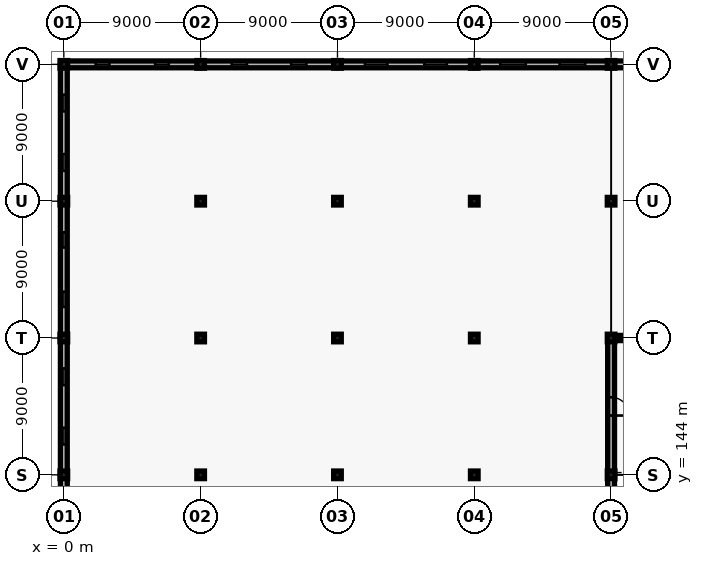
"""IFC4 building model, lengths in metres.
Left out: names, types, materials, properties, quantities, classifications, styles, units other than length and angle.
Written with IfcOpenShell. Run it as: python <this file> out.ifc"""

import sys

from ifc_helpers import new_model, si_unit, direction, frame, frame_2d, origin, origin_2d, place, context, subcontext, project, spatial, rectangle, extrude, element, fill, save


model = new_model("IFC4")
c1 = context("Model", 3, precision=1e-05, world=origin(), true_north=direction((0.0, 1.0)))
c2 = subcontext(c1, "Body", "Model", "MODEL_VIEW")
j1 = project(units=[si_unit("LENGTHUNIT", "METRE"), si_unit("PLANEANGLEUNIT", "RADIAN")], contexts=[c1])
p1 = place(None, origin())
s1 = spatial("IfcSite", under=j1, at=p1, CompositionType="ELEMENT")
p2 = place(p1, origin())
s2 = spatial("IfcBuilding", under=s1, at=p2, CompositionType="ELEMENT")
p3 = place(p2, frame((0.0, 0.0, 9.6)))
s3 = spatial("IfcBuildingStorey", under=s2, at=p3, CompositionType="ELEMENT", Elevation=9.6)
for number, where, z_axis, x_axis in (
    (1, (0.0, 144.0, 0.0), (0.0, 0.0, 1.0), (1.0, 0.0, 0.0)),
    (2, (0.0, 153.0, 0.0), (0.0, 0.0, 1.0), (1.0, 0.0, 0.0)),
    (3, (0.0, 162.0, 0.0), (0.0, 0.0, 1.0), (1.0, 0.0, 0.0)),
    (4, (0.0, 171.0, 0.0), (0.0, 0.0, 1.0), (1.0, 0.0, 0.0)),
    (5, (9.0, 144.0, 0.0), (0.0, 0.0, 1.0), (1.0, 0.0, 0.0)),
    (6, (9.0, 153.0, 0.0), (0.0, 0.0, 1.0), (1.0, 0.0, 0.0)),
    (7, (9.0, 162.0, 0.0), (0.0, 0.0, 1.0), (1.0, 0.0, 0.0)),
    (8, (9.0, 171.0, 0.0), (0.0, 0.0, 1.0), (1.0, 0.0, 0.0)),
    (9, (18.0, 144.0, 0.0), (0.0, 0.0, 1.0), (1.0, 0.0, 0.0)),
    (10, (18.0, 153.0, 0.0), (0.0, 0.0, 1.0), (1.0, 0.0, 0.0)),
    (11, (18.0, 162.0, 0.0), (0.0, 0.0, 1.0), (1.0, 0.0, 0.0)),
    (12, (18.0, 171.0, 0.0), (0.0, 0.0, 1.0), (1.0, 0.0, 0.0)),
    (13, (27.0, 144.0, 0.0), (0.0, 0.0, 1.0), (1.0, 0.0, 0.0)),
    (14, (27.0, 153.0, 0.0), (0.0, 0.0, 1.0), (1.0, 0.0, 0.0)),
    (15, (27.0, 162.0, 0.0), (0.0, 0.0, 1.0), (1.0, 0.0, 0.0)),
    (16, (27.0, 171.0, 0.0), (0.0, 0.0, 1.0), (1.0, 0.0, 0.0)),
    (17, (36.0, 144.0, 0.0), (0.0, 0.0, 1.0), (1.0, 0.0, 0.0)),
    (18, (36.0, 153.0, 0.0), (0.0, 0.0, 1.0), (1.0, 0.0, 0.0)),
    (19, (36.0, 162.0, 0.0), (0.0, 0.0, 1.0), (1.0, 0.0, 0.0)),
    (20, (36.0, 171.0, 0.0), (0.0, 0.0, 1.0), (1.0, 0.0, 0.0)),
):
    element("IfcColumn", number, at=place(p3, frame(where, z_axis=z_axis, x_axis=x_axis)), inside=s3, PredefinedType="COLUMN", context=c2, shape_type="SweptSolid", body=[
        extrude(rectangle(XDim=0.5, YDim=0.5, at=origin_2d()), origin(), (0.0, 0.0, 1.0), 3.9),
    ])
p4 = place(p3, frame((0.06, 171.0, 0.0), z_axis=(0.0, 0.0, 1.0), x_axis=(1.0, 0.0, 0.0)))
e21 = element("IfcWall", 21, at=p4, inside=s3, PredefinedType="SOLIDWALL", context=c2, shape_type="SweptSolid", body=[
    extrude(rectangle(XDim=8.88, YDim=0.45, at=frame_2d((4.44, 0.0))), origin(), (0.0, 0.0, 1.0), 3.15),
])
p5 = place(p4, frame((2.036, 0.0, 0.9)))
e22 = element("IfcOpeningElement", 22, at=p5, cuts=e21, PredefinedType="OPENING", context=c2, shape_type="SweptSolid", body=[
    extrude(rectangle(XDim=0.9, YDim=1.2, at=frame_2d((0.45, 0.6))), frame((0.0, 0.235, 0.0), z_axis=(0.0, -1.0, 0.0), x_axis=(1.0, 0.0, 0.0)), (0.0, 0.0, 1.0), 0.47),
])
p6 = place(p4, frame((5.944, 0.0, 0.9)))
e23 = element("IfcOpeningElement", 23, at=p6, cuts=e21, PredefinedType="OPENING", context=c2, shape_type="SweptSolid", body=[
    extrude(rectangle(XDim=0.9, YDim=1.2, at=frame_2d((0.45, 0.6))), frame((0.0, 0.235, 0.0), z_axis=(0.0, -1.0, 0.0), x_axis=(1.0, 0.0, 0.0)), (0.0, 0.0, 1.0), 0.47),
])
p7 = place(p3, frame((9.06, 171.0, 0.0), z_axis=(0.0, 0.0, 1.0), x_axis=(1.0, 0.0, 0.0)))
e24 = element("IfcWall", 24, at=p7, inside=s3, PredefinedType="SOLIDWALL", context=c2, shape_type="SweptSolid", body=[
    extrude(rectangle(XDim=8.88, YDim=0.45, at=frame_2d((4.44, 0.0))), origin(), (0.0, 0.0, 1.0), 3.15),
])
p8 = place(p7, frame((1.986, 0.0, 0.9)))
e25 = element("IfcOpeningElement", 25, at=p8, cuts=e24, PredefinedType="OPENING", context=c2, shape_type="SweptSolid", body=[
    extrude(rectangle(XDim=1.0, YDim=1.5, at=frame_2d((0.5, 0.75))), frame((0.0, 0.235, 0.0), z_axis=(0.0, -1.0, 0.0), x_axis=(1.0, 0.0, 0.0)), (0.0, 0.0, 1.0), 0.47),
])
p9 = place(p7, frame((5.894, 0.0, 0.9)))
e26 = element("IfcOpeningElement", 26, at=p9, cuts=e24, PredefinedType="OPENING", context=c2, shape_type="SweptSolid", body=[
    extrude(rectangle(XDim=1.0, YDim=1.5, at=frame_2d((0.5, 0.75))), frame((0.0, 0.235, 0.0), z_axis=(0.0, -1.0, 0.0), x_axis=(1.0, 0.0, 0.0)), (0.0, 0.0, 1.0), 0.47),
])
p10 = place(p3, frame((18.06, 171.0, 0.0), z_axis=(0.0, 0.0, 1.0), x_axis=(1.0, 0.0, 0.0)))
e27 = element("IfcWall", 27, at=p10, inside=s3, PredefinedType="SOLIDWALL", context=c2, shape_type="SweptSolid", body=[
    extrude(rectangle(XDim=8.88, YDim=0.45, at=frame_2d((4.44, 0.0))), origin(), (0.0, 0.0, 1.0), 3.15),
])
p11 = place(p10, frame((1.746, 0.0, 0.9)))
e28 = element("IfcOpeningElement", 28, at=p11, cuts=e27, PredefinedType="OPENING", context=c2, shape_type="SweptSolid", body=[
    extrude(rectangle(XDim=1.48, YDim=1.75, at=frame_2d((0.74, 0.875))), frame((0.0, 0.235, 0.0), z_axis=(0.0, -1.0, 0.0), x_axis=(1.0, 0.0, 0.0)), (0.0, 0.0, 1.0), 0.47),
])
p12 = place(p10, frame((5.654, 0.0, 0.9)))
e29 = element("IfcOpeningElement", 29, at=p12, cuts=e27, PredefinedType="OPENING", context=c2, shape_type="SweptSolid", body=[
    extrude(rectangle(XDim=1.48, YDim=1.75, at=frame_2d((0.74, 0.875))), frame((0.0, 0.235, 0.0), z_axis=(0.0, -1.0, 0.0), x_axis=(1.0, 0.0, 0.0)), (0.0, 0.0, 1.0), 0.47),
])
p13 = place(p3, frame((27.06, 171.0, 0.0), z_axis=(0.0, 0.0, 1.0), x_axis=(1.0, 0.0, 0.0)))
e30 = element("IfcWall", 30, at=p13, inside=s3, PredefinedType="SOLIDWALL", context=c2, shape_type="SweptSolid", body=[
    extrude(rectangle(XDim=8.88, YDim=0.45, at=frame_2d((4.44, 0.0))), origin(), (0.0, 0.0, 1.0), 3.15),
])
p14 = place(p13, frame((1.646, 0.0, 0.9)))
e31 = element("IfcOpeningElement", 31, at=p14, cuts=e30, PredefinedType="OPENING", context=c2, shape_type="SweptSolid", body=[
    extrude(rectangle(XDim=1.68, YDim=1.85, at=frame_2d((0.84, 0.925))), frame((0.0, 0.235, 0.0), z_axis=(0.0, -1.0, 0.0), x_axis=(1.0, 0.0, 0.0)), (0.0, 0.0, 1.0), 0.47),
])
p15 = place(p13, frame((5.554, 0.0, 0.9)))
e32 = element("IfcOpeningElement", 32, at=p15, cuts=e30, PredefinedType="OPENING", context=c2, shape_type="SweptSolid", body=[
    extrude(rectangle(XDim=1.68, YDim=1.85, at=frame_2d((0.84, 0.925))), frame((0.0, 0.235, 0.0), z_axis=(0.0, -1.0, 0.0), x_axis=(1.0, 0.0, 0.0)), (0.0, 0.0, 1.0), 0.47),
])
p16 = place(p3, frame((36.06, 171.0, 0.0), z_axis=(0.0, 0.0, 1.0), x_axis=(1.0, 0.0, 0.0)))
e33 = element("IfcWall", 33, at=p16, inside=s3, PredefinedType="SOLIDWALL", context=c2, shape_type="SweptSolid", body=[
    extrude(rectangle(XDim=8.88, YDim=0.45, at=frame_2d((4.44, 0.0))), origin(), (0.0, 0.0, 1.0), 3.15),
])
p17 = place(p16, frame((2.036, 0.0, 0.9)))
e34 = element("IfcOpeningElement", 34, at=p17, cuts=e33, PredefinedType="OPENING", context=c2, shape_type="SweptSolid", body=[
    extrude(rectangle(XDim=0.9, YDim=1.2, at=frame_2d((0.45, 0.6))), frame((0.0, 0.235, 0.0), z_axis=(0.0, -1.0, 0.0), x_axis=(1.0, 0.0, 0.0)), (0.0, 0.0, 1.0), 0.47),
])
p18 = place(p16, frame((5.944, 0.0, 0.9)))
e35 = element("IfcOpeningElement", 35, at=p18, cuts=e33, PredefinedType="OPENING", context=c2, shape_type="SweptSolid", body=[
    extrude(rectangle(XDim=0.9, YDim=1.2, at=frame_2d((0.45, 0.6))), frame((0.0, 0.235, 0.0), z_axis=(0.0, -1.0, 0.0), x_axis=(1.0, 0.0, 0.0)), (0.0, 0.0, 1.0), 0.47),
])
p19 = place(p3, frame((0.0, 135.06, 0.0), z_axis=(0.0, 0.0, 1.0), x_axis=(0.0, 1.0, 0.0)))
e36 = element("IfcWall", 36, at=p19, inside=s3, PredefinedType="SOLIDWALL", context=c2, shape_type="SweptSolid", body=[
    extrude(rectangle(XDim=8.88, YDim=0.45, at=frame_2d((4.44, 0.0))), origin(), (0.0, 0.0, 1.0), 3.15),
])
p20 = place(p19, frame((1.986, 0.0, 0.9)))
e37 = element("IfcOpeningElement", 37, at=p20, cuts=e36, PredefinedType="OPENING", context=c2, shape_type="SweptSolid", body=[
    extrude(rectangle(XDim=1.0, YDim=1.5, at=frame_2d((0.5, 0.75))), frame((0.0, 0.235, 0.0), z_axis=(0.0, -1.0, 0.0), x_axis=(1.0, 0.0, 0.0)), (0.0, 0.0, 1.0), 0.47),
])
p21 = place(p19, frame((5.894, 0.0, 0.9)))
e38 = element("IfcOpeningElement", 38, at=p21, cuts=e36, PredefinedType="OPENING", context=c2, shape_type="SweptSolid", body=[
    extrude(rectangle(XDim=1.0, YDim=1.5, at=frame_2d((0.5, 0.75))), frame((0.0, 0.235, 0.0), z_axis=(0.0, -1.0, 0.0), x_axis=(1.0, 0.0, 0.0)), (0.0, 0.0, 1.0), 0.47),
])
p22 = place(p3, frame((0.0, 144.06, 0.0), z_axis=(0.0, 0.0, 1.0), x_axis=(0.0, 1.0, 0.0)))
e39 = element("IfcWall", 39, at=p22, inside=s3, PredefinedType="SOLIDWALL", context=c2, shape_type="SweptSolid", body=[
    extrude(rectangle(XDim=8.88, YDim=0.45, at=frame_2d((4.44, 0.0))), origin(), (0.0, 0.0, 1.0), 3.15),
])
p23 = place(p22, frame((1.936, 0.0, 0.9)))
e40 = element("IfcOpeningElement", 40, at=p23, cuts=e39, PredefinedType="OPENING", context=c2, shape_type="SweptSolid", body=[
    extrude(rectangle(XDim=1.1, YDim=1.65, at=frame_2d((0.55, 0.825))), frame((0.0, 0.235, 0.0), z_axis=(0.0, -1.0, 0.0), x_axis=(1.0, 0.0, 0.0)), (0.0, 0.0, 1.0), 0.47),
])
p24 = place(p22, frame((5.844, 0.0, 0.9)))
e41 = element("IfcOpeningElement", 41, at=p24, cuts=e39, PredefinedType="OPENING", context=c2, shape_type="SweptSolid", body=[
    extrude(rectangle(XDim=1.1, YDim=1.65, at=frame_2d((0.55, 0.825))), frame((0.0, 0.235, 0.0), z_axis=(0.0, -1.0, 0.0), x_axis=(1.0, 0.0, 0.0)), (0.0, 0.0, 1.0), 0.47),
])
p25 = place(p3, frame((0.0, 153.06, 0.0), z_axis=(0.0, 0.0, 1.0), x_axis=(0.0, 1.0, 0.0)))
e42 = element("IfcWall", 42, at=p25, inside=s3, PredefinedType="SOLIDWALL", context=c2, shape_type="SweptSolid", body=[
    extrude(rectangle(XDim=8.88, YDim=0.45, at=frame_2d((4.44, 0.0))), origin(), (0.0, 0.0, 1.0), 3.15),
])
p26 = place(p25, frame((1.986, 0.0, 0.9)))
e43 = element("IfcOpeningElement", 43, at=p26, cuts=e42, PredefinedType="OPENING", context=c2, shape_type="SweptSolid", body=[
    extrude(rectangle(XDim=1.0, YDim=1.5, at=frame_2d((0.5, 0.75))), frame((0.0, 0.235, 0.0), z_axis=(0.0, -1.0, 0.0), x_axis=(1.0, 0.0, 0.0)), (0.0, 0.0, 1.0), 0.47),
])
p27 = place(p25, frame((5.894, 0.0, 0.9)))
e44 = element("IfcOpeningElement", 44, at=p27, cuts=e42, PredefinedType="OPENING", context=c2, shape_type="SweptSolid", body=[
    extrude(rectangle(XDim=1.0, YDim=1.5, at=frame_2d((0.5, 0.75))), frame((0.0, 0.235, 0.0), z_axis=(0.0, -1.0, 0.0), x_axis=(1.0, 0.0, 0.0)), (0.0, 0.0, 1.0), 0.47),
])
p28 = place(p3, frame((0.0, 162.06, 0.0), z_axis=(0.0, 0.0, 1.0), x_axis=(0.0, 1.0, 0.0)))
e45 = element("IfcWall", 45, at=p28, inside=s3, PredefinedType="SOLIDWALL", context=c2, shape_type="SweptSolid", body=[
    extrude(rectangle(XDim=8.88, YDim=0.45, at=frame_2d((4.44, 0.0))), origin(), (0.0, 0.0, 1.0), 3.15),
])
p29 = place(p28, frame((1.936, 0.0, 0.9)))
e46 = element("IfcOpeningElement", 46, at=p29, cuts=e45, PredefinedType="OPENING", context=c2, shape_type="SweptSolid", body=[
    extrude(rectangle(XDim=1.1, YDim=1.65, at=frame_2d((0.55, 0.825))), frame((0.0, 0.235, 0.0), z_axis=(0.0, -1.0, 0.0), x_axis=(1.0, 0.0, 0.0)), (0.0, 0.0, 1.0), 0.47),
])
p30 = place(p28, frame((5.844, 0.0, 0.9)))
e47 = element("IfcOpeningElement", 47, at=p30, cuts=e45, PredefinedType="OPENING", context=c2, shape_type="SweptSolid", body=[
    extrude(rectangle(XDim=1.1, YDim=1.65, at=frame_2d((0.55, 0.825))), frame((0.0, 0.235, 0.0), z_axis=(0.0, -1.0, 0.0), x_axis=(1.0, 0.0, 0.0)), (0.0, 0.0, 1.0), 0.47),
])
p31 = place(p3, frame((36.0, 135.06, 0.0), z_axis=(0.0, 0.0, 1.0), x_axis=(0.0, 1.0, 0.0)))
e48 = element("IfcWall", 48, at=p31, inside=s3, PredefinedType="SOLIDWALL", context=c2, shape_type="SweptSolid", body=[
    extrude(rectangle(XDim=8.88, YDim=0.45, at=frame_2d((4.44, 0.0))), origin(), (0.0, 0.0, 1.0), 3.15),
])
p32 = place(p31, frame((1.661, 0.0, 0.9)))
e49 = element("IfcOpeningElement", 49, at=p32, cuts=e48, PredefinedType="OPENING", context=c2, shape_type="SweptSolid", body=[
    extrude(rectangle(XDim=1.65, YDim=1.5, at=frame_2d((0.825, 0.75))), frame((0.0, 0.235, 0.0), z_axis=(0.0, -1.0, 0.0), x_axis=(1.0, 0.0, 0.0)), (0.0, 0.0, 1.0), 0.47),
])
p33 = place(p31, frame((5.569, 0.0, 0.9)))
e50 = element("IfcOpeningElement", 50, at=p33, cuts=e48, PredefinedType="OPENING", context=c2, shape_type="SweptSolid", body=[
    extrude(rectangle(XDim=1.65, YDim=1.5, at=frame_2d((0.825, 0.75))), frame((0.0, 0.235, 0.0), z_axis=(0.0, -1.0, 0.0), x_axis=(1.0, 0.0, 0.0)), (0.0, 0.0, 1.0), 0.47),
])
p34 = place(p3, frame((36.0, 144.06, 0.0), z_axis=(0.0, 0.0, 1.0), x_axis=(0.0, 1.0, 0.0)))
e51 = element("IfcWall", 51, at=p34, inside=s3, PredefinedType="SOLIDWALL", context=c2, shape_type="SweptSolid", body=[
    extrude(rectangle(XDim=8.88, YDim=0.45, at=frame_2d((4.44, 0.0))), origin(), (0.0, 0.0, 1.0), 3.15),
])
p35 = place(p34, frame((3.84, 0.0, 0.0)))
e52 = element("IfcOpeningElement", 52, at=p35, cuts=e51, PredefinedType="OPENING", context=c2, shape_type="SweptSolid", body=[
    extrude(rectangle(XDim=1.2, YDim=2.15, at=frame_2d((0.6, 1.075))), frame((0.0, 0.235, 0.0), z_axis=(0.0, -1.0, 0.0), x_axis=(1.0, 0.0, 0.0)), (0.0, 0.0, 1.0), 0.47),
])
p36 = place(p3, frame((36.06, 153.0, 0.0), z_axis=(0.0, 0.0, 1.0), x_axis=(1.0, 0.0, 0.0)))
e53 = element("IfcWall", 53, at=p36, inside=s3, PredefinedType="SOLIDWALL", context=c2, shape_type="SweptSolid", body=[
    extrude(rectangle(XDim=8.88, YDim=0.34, at=frame_2d((4.44, 0.0))), origin(), (0.0, 0.0, 1.0), 3.15),
])
p37 = place(p36, frame((1.811, 0.0, 0.9)))
e54 = element("IfcOpeningElement", 54, at=p37, cuts=e53, PredefinedType="OPENING", context=c2, shape_type="SweptSolid", body=[
    extrude(rectangle(XDim=1.35, YDim=1.5, at=frame_2d((0.675, 0.75))), frame((0.0, 0.18, 0.0), z_axis=(0.0, -1.0, 0.0), x_axis=(1.0, 0.0, 0.0)), (0.0, 0.0, 1.0), 0.36),
])
p38 = place(p36, frame((5.719, 0.0, 0.9)))
e55 = element("IfcOpeningElement", 55, at=p38, cuts=e53, PredefinedType="OPENING", context=c2, shape_type="SweptSolid", body=[
    extrude(rectangle(XDim=1.35, YDim=1.5, at=frame_2d((0.675, 0.75))), frame((0.0, 0.18, 0.0), z_axis=(0.0, -1.0, 0.0), x_axis=(1.0, 0.0, 0.0)), (0.0, 0.0, 1.0), 0.36),
])
p39 = place(p5, origin())
e56 = element("IfcWindow", 56, at=p39, inside=s3, PartitioningType="SINGLE_PANEL", PredefinedType="WINDOW", context=c2, shape_type="SweptSolid", body=[
    extrude(rectangle(XDim=0.9, YDim=1.2, at=frame_2d((0.45, 0.6))), frame((0.0, 0.03, 0.0), z_axis=(0.0, -1.0, 0.0), x_axis=(1.0, 0.0, 0.0)), (0.0, 0.0, 1.0), 0.06),
])
fill(e22, e56)
p40 = place(p6, origin())
e57 = element("IfcWindow", 57, at=p40, inside=s3, PartitioningType="SINGLE_PANEL", PredefinedType="WINDOW", context=c2, shape_type="SweptSolid", body=[
    extrude(rectangle(XDim=0.9, YDim=1.2, at=frame_2d((0.45, 0.6))), frame((0.0, 0.03, 0.0), z_axis=(0.0, -1.0, 0.0), x_axis=(1.0, 0.0, 0.0)), (0.0, 0.0, 1.0), 0.06),
])
fill(e23, e57)
p41 = place(p8, origin())
e58 = element("IfcWindow", 58, at=p41, inside=s3, PartitioningType="SINGLE_PANEL", PredefinedType="WINDOW", context=c2, shape_type="SweptSolid", body=[
    extrude(rectangle(XDim=1.0, YDim=1.5, at=frame_2d((0.5, 0.75))), frame((0.0, 0.03, 0.0), z_axis=(0.0, -1.0, 0.0), x_axis=(1.0, 0.0, 0.0)), (0.0, 0.0, 1.0), 0.06),
])
fill(e25, e58)
p42 = place(p9, origin())
e59 = element("IfcWindow", 59, at=p42, inside=s3, PartitioningType="SINGLE_PANEL", PredefinedType="WINDOW", context=c2, shape_type="SweptSolid", body=[
    extrude(rectangle(XDim=1.0, YDim=1.5, at=frame_2d((0.5, 0.75))), frame((0.0, 0.03, 0.0), z_axis=(0.0, -1.0, 0.0), x_axis=(1.0, 0.0, 0.0)), (0.0, 0.0, 1.0), 0.06),
])
fill(e26, e59)
p43 = place(p11, origin())
e60 = element("IfcWindow", 60, at=p43, inside=s3, PartitioningType="SINGLE_PANEL", PredefinedType="WINDOW", context=c2, shape_type="SweptSolid", body=[
    extrude(rectangle(XDim=1.48, YDim=1.75, at=frame_2d((0.74, 0.875))), frame((0.0, 0.03, 0.0), z_axis=(0.0, -1.0, 0.0), x_axis=(1.0, 0.0, 0.0)), (0.0, 0.0, 1.0), 0.06),
])
fill(e28, e60)
p44 = place(p12, origin())
e61 = element("IfcWindow", 61, at=p44, inside=s3, PartitioningType="SINGLE_PANEL", PredefinedType="WINDOW", context=c2, shape_type="SweptSolid", body=[
    extrude(rectangle(XDim=1.48, YDim=1.75, at=frame_2d((0.74, 0.875))), frame((0.0, 0.03, 0.0), z_axis=(0.0, -1.0, 0.0), x_axis=(1.0, 0.0, 0.0)), (0.0, 0.0, 1.0), 0.06),
])
fill(e29, e61)
p45 = place(p14, origin())
e62 = element("IfcWindow", 62, at=p45, inside=s3, PartitioningType="SINGLE_PANEL", PredefinedType="WINDOW", context=c2, shape_type="SweptSolid", body=[
    extrude(rectangle(XDim=1.68, YDim=1.85, at=frame_2d((0.84, 0.925))), frame((0.0, 0.03, 0.0), z_axis=(0.0, -1.0, 0.0), x_axis=(1.0, 0.0, 0.0)), (0.0, 0.0, 1.0), 0.06),
])
fill(e31, e62)
p46 = place(p15, origin())
e63 = element("IfcWindow", 63, at=p46, inside=s3, PartitioningType="SINGLE_PANEL", PredefinedType="WINDOW", context=c2, shape_type="SweptSolid", body=[
    extrude(rectangle(XDim=1.68, YDim=1.85, at=frame_2d((0.84, 0.925))), frame((0.0, 0.03, 0.0), z_axis=(0.0, -1.0, 0.0), x_axis=(1.0, 0.0, 0.0)), (0.0, 0.0, 1.0), 0.06),
])
fill(e32, e63)
p47 = place(p23, origin())
e64 = element("IfcWindow", 64, at=p47, inside=s3, PartitioningType="SINGLE_PANEL", PredefinedType="WINDOW", context=c2, shape_type="SweptSolid", body=[
    extrude(rectangle(XDim=1.1, YDim=1.65, at=frame_2d((0.55, 0.825))), frame((0.0, 0.03, 0.0), z_axis=(0.0, -1.0, 0.0), x_axis=(1.0, 0.0, 0.0)), (0.0, 0.0, 1.0), 0.06),
])
fill(e40, e64)
p48 = place(p24, origin())
e65 = element("IfcWindow", 65, at=p48, inside=s3, PartitioningType="SINGLE_PANEL", PredefinedType="WINDOW", context=c2, shape_type="SweptSolid", body=[
    extrude(rectangle(XDim=1.1, YDim=1.65, at=frame_2d((0.55, 0.825))), frame((0.0, 0.03, 0.0), z_axis=(0.0, -1.0, 0.0), x_axis=(1.0, 0.0, 0.0)), (0.0, 0.0, 1.0), 0.06),
])
fill(e41, e65)
p49 = place(p26, origin())
e66 = element("IfcWindow", 66, at=p49, inside=s3, PartitioningType="SINGLE_PANEL", PredefinedType="WINDOW", context=c2, shape_type="SweptSolid", body=[
    extrude(rectangle(XDim=1.0, YDim=1.5, at=frame_2d((0.5, 0.75))), frame((0.0, 0.03, 0.0), z_axis=(0.0, -1.0, 0.0), x_axis=(1.0, 0.0, 0.0)), (0.0, 0.0, 1.0), 0.06),
])
fill(e43, e66)
p50 = place(p27, origin())
e67 = element("IfcWindow", 67, at=p50, inside=s3, PartitioningType="SINGLE_PANEL", PredefinedType="WINDOW", context=c2, shape_type="SweptSolid", body=[
    extrude(rectangle(XDim=1.0, YDim=1.5, at=frame_2d((0.5, 0.75))), frame((0.0, 0.03, 0.0), z_axis=(0.0, -1.0, 0.0), x_axis=(1.0, 0.0, 0.0)), (0.0, 0.0, 1.0), 0.06),
])
fill(e44, e67)
p51 = place(p29, origin())
e68 = element("IfcWindow", 68, at=p51, inside=s3, PartitioningType="SINGLE_PANEL", PredefinedType="WINDOW", context=c2, shape_type="SweptSolid", body=[
    extrude(rectangle(XDim=1.1, YDim=1.65, at=frame_2d((0.55, 0.825))), frame((0.0, 0.03, 0.0), z_axis=(0.0, -1.0, 0.0), x_axis=(1.0, 0.0, 0.0)), (0.0, 0.0, 1.0), 0.06),
])
fill(e46, e68)
p52 = place(p30, origin())
e69 = element("IfcWindow", 69, at=p52, inside=s3, PartitioningType="SINGLE_PANEL", PredefinedType="WINDOW", context=c2, shape_type="SweptSolid", body=[
    extrude(rectangle(XDim=1.1, YDim=1.65, at=frame_2d((0.55, 0.825))), frame((0.0, 0.03, 0.0), z_axis=(0.0, -1.0, 0.0), x_axis=(1.0, 0.0, 0.0)), (0.0, 0.0, 1.0), 0.06),
])
fill(e47, e69)
p53 = place(p35, frame((1.2, 0.0, 0.0), z_axis=(0.0, 0.0, 1.0), x_axis=(-1.0, 0.0, 0.0)))
e70 = element("IfcDoor", 70, at=p53, inside=s3, OperationType="SINGLE_SWING_LEFT", PredefinedType="DOOR", context=c2, shape_type="SweptSolid", body=[
    extrude(rectangle(XDim=1.2, YDim=2.15, at=frame_2d((0.6, 1.075))), frame((0.0, 0.025, 0.0), z_axis=(0.0, -1.0, 0.0), x_axis=(1.0, 0.0, 0.0)), (0.0, 0.0, 1.0), 0.05),
])
fill(e52, e70)
save(model, sys.argv[1])
